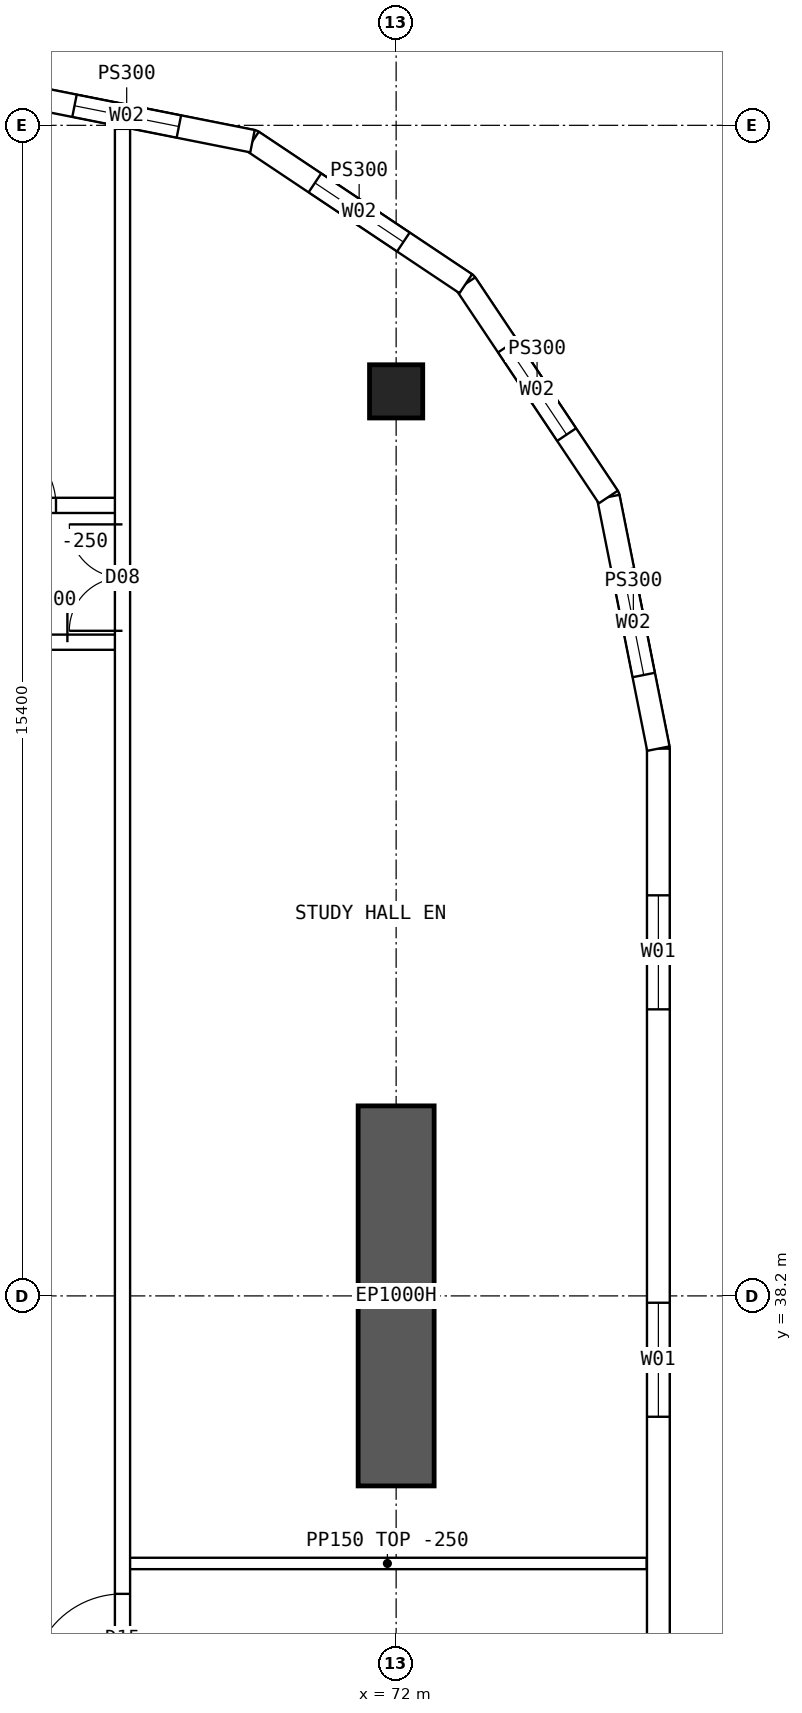
"""IFC4 building model, lengths in metres.
Left out: names, types, materials, properties, quantities, classifications, styles, units other than length and angle.
Written with IfcOpenShell. Run it as: python <this file> out.ifc"""

import sys

from ifc_helpers import new_model, si_unit, direction, frame, frame_2d, origin, origin_2d, place, context, subcontext, project, spatial, polyline, rectangle, hollow_rectangle, outline, extrude, element, fill, save


model = new_model("IFC4")
c1 = context("Model", 3, precision=1e-05, world=origin(), true_north=direction((0.0, 1.0)))
c2 = subcontext(c1, "Body", "Model", "MODEL_VIEW")
j1 = project(units=[si_unit("LENGTHUNIT", "METRE"), si_unit("PLANEANGLEUNIT", "RADIAN")], contexts=[c1])
p1 = place(None, origin())
s1 = spatial("IfcSite", under=j1, at=p1, CompositionType="ELEMENT")
p2 = place(p1, origin())
s2 = spatial("IfcBuilding", under=s1, at=p2, CompositionType="ELEMENT")
p3 = place(p2, frame((0.0, 0.0, 163.6)))
s3 = spatial("IfcBuildingStorey", under=s2, at=p3, CompositionType="ELEMENT", Elevation=163.6)
p4 = place(p3, frame((72.0, 50.1, 0.0), z_axis=(0.0, 0.0, 1.0), x_axis=(1.0, 0.0, 0.0)))
e1 = element("IfcColumn", 1, at=p4, inside=s3, PredefinedType="COLUMN", context=c2, shape_type="SweptSolid", body=[
    extrude(hollow_rectangle(XDim=0.7, YDim=0.7, WallThickness=0.07, at=origin_2d()), origin(), (0.0, 0.0, 1.0), 3.75),
])
p5 = place(p3, frame((72.0, 35.7, 0.0), z_axis=(0.0, 0.0, 1.0), x_axis=(0.0, 1.0, 0.0)))
e2 = element("IfcWall", 2, at=p5, inside=s3, PredefinedType="SHEAR", context=c2, shape_type="SweptSolid", body=[
    extrude(rectangle(XDim=5.0, YDim=1.0, at=frame_2d((2.5, 0.0))), origin(), (0.0, 0.0, 1.0), 3.75),
])
p6 = place(p3, frame((75.45, 18.6, 0.0), z_axis=(0.0, 0.0, 1.0), x_axis=(0.0, 1.0, 0.0)))
e3 = element("IfcWall", 3, at=p6, inside=s3, PredefinedType="SOLIDWALL", context=c2, shape_type="SweptSolid", body=[
    extrude(outline(polyline([(-0.015, -0.15), (26.815, -0.15), (26.785, 0.15), (0.015, 0.15), (-0.015, -0.15)])), origin(), (0.0, 0.0, 1.0), 3.5),
])
p7 = place(p6, frame((1.93, 0.0, 0.9)))
e4 = element("IfcOpeningElement", 4, at=p7, cuts=e3, PredefinedType="OPENING", context=c2, shape_type="SweptSolid", body=[
    extrude(rectangle(XDim=1.5, YDim=2.0, at=frame_2d((0.75, 1.0))), frame((0.0, 0.16, 0.0), z_axis=(0.0, -1.0, 0.0), x_axis=(1.0, 0.0, 0.0)), (0.0, 0.0, 1.0), 0.32),
])
p8 = place(p6, frame((7.29, 0.0, 0.9)))
e5 = element("IfcOpeningElement", 5, at=p8, cuts=e3, PredefinedType="OPENING", context=c2, shape_type="SweptSolid", body=[
    extrude(rectangle(XDim=1.5, YDim=2.0, at=frame_2d((0.75, 1.0))), frame((0.0, 0.16, 0.0), z_axis=(0.0, -1.0, 0.0), x_axis=(1.0, 0.0, 0.0)), (0.0, 0.0, 1.0), 0.32),
])
p9 = place(p6, frame((12.65, 0.0, 0.9)))
e6 = element("IfcOpeningElement", 6, at=p9, cuts=e3, PredefinedType="OPENING", context=c2, shape_type="SweptSolid", body=[
    extrude(rectangle(XDim=1.5, YDim=2.0, at=frame_2d((0.75, 1.0))), frame((0.0, 0.16, 0.0), z_axis=(0.0, -1.0, 0.0), x_axis=(1.0, 0.0, 0.0)), (0.0, 0.0, 1.0), 0.32),
])
p10 = place(p6, frame((18.01, 0.0, 0.9)))
e7 = element("IfcOpeningElement", 7, at=p10, cuts=e3, PredefinedType="OPENING", context=c2, shape_type="SweptSolid", body=[
    extrude(rectangle(XDim=1.5, YDim=2.0, at=frame_2d((0.75, 1.0))), frame((0.0, 0.16, 0.0), z_axis=(0.0, -1.0, 0.0), x_axis=(1.0, 0.0, 0.0)), (0.0, 0.0, 1.0), 0.32),
])
p11 = place(p6, frame((23.37, 0.0, 0.9)))
e8 = element("IfcOpeningElement", 8, at=p11, cuts=e3, PredefinedType="OPENING", context=c2, shape_type="SweptSolid", body=[
    extrude(rectangle(XDim=1.5, YDim=2.0, at=frame_2d((0.75, 1.0))), frame((0.0, 0.16, 0.0), z_axis=(0.0, -1.0, 0.0), x_axis=(1.0, 0.0, 0.0)), (0.0, 0.0, 1.0), 0.32),
])
p12 = place(p3, frame((75.45, 45.4, 0.0), z_axis=(0.0, 0.0, 1.0), x_axis=(-0.19508664885, 0.980786011034, 0.0)))
e9 = element("IfcWall", 9, at=p12, inside=s3, PredefinedType="SOLIDWALL", context=c2, shape_type="SweptSolid", body=[
    extrude(outline(polyline([(-0.015, -0.15), (3.405, -0.15), (3.345, 0.15), (0.015, 0.15), (-0.015, -0.15)])), origin(), (0.0, 0.0, 1.0), 3.5),
])
p13 = place(p12, frame((0.988, 0.0, 0.9)))
e10 = element("IfcOpeningElement", 10, at=p13, cuts=e9, PredefinedType="OPENING", context=c2, shape_type="SweptSolid", body=[
    extrude(rectangle(XDim=1.4, YDim=1.8, at=frame_2d((0.7, 0.9))), frame((0.0, 0.16, 0.0), z_axis=(0.0, -1.0, 0.0), x_axis=(1.0, 0.0, 0.0)), (0.0, 0.0, 1.0), 0.32),
])
p14 = place(p3, frame((74.792, 48.71, 0.0), z_axis=(0.0, 0.0, 1.0), x_axis=(-0.555534554399, 0.831493450887, 0.0)))
e11 = element("IfcWall", 11, at=p14, inside=s3, PredefinedType="SOLIDWALL", context=c2, shape_type="SweptSolid", body=[
    extrude(outline(polyline([(-0.03, -0.15), (3.405, -0.15), (3.345, 0.15), (0.03, 0.15), (-0.03, -0.15)])), origin(), (0.0, 0.0, 1.0), 3.5),
])
p15 = place(p14, frame((0.988, 0.0, 0.9)))
e12 = element("IfcOpeningElement", 12, at=p15, cuts=e11, PredefinedType="OPENING", context=c2, shape_type="SweptSolid", body=[
    extrude(rectangle(XDim=1.4, YDim=1.8, at=frame_2d((0.7, 0.9))), frame((0.0, 0.16, 0.0), z_axis=(0.0, -1.0, 0.0), x_axis=(1.0, 0.0, 0.0)), (0.0, 0.0, 1.0), 0.32),
])
p16 = place(p3, frame((72.917, 51.517, 0.0), z_axis=(0.0, 0.0, 1.0), x_axis=(-0.831493450887, 0.555534554399, 0.0)))
e13 = element("IfcWall", 13, at=p16, inside=s3, PredefinedType="SOLIDWALL", context=c2, shape_type="SweptSolid", body=[
    extrude(outline(polyline([(-0.03, -0.15), (3.405, -0.15), (3.345, 0.15), (0.03, 0.15), (-0.03, -0.15)])), origin(), (0.0, 0.0, 1.0), 3.5),
])
p17 = place(p16, frame((0.988, 0.0, 0.9)))
e14 = element("IfcOpeningElement", 14, at=p17, cuts=e13, PredefinedType="OPENING", context=c2, shape_type="SweptSolid", body=[
    extrude(rectangle(XDim=1.4, YDim=1.8, at=frame_2d((0.7, 0.9))), frame((0.0, 0.16, 0.0), z_axis=(0.0, -1.0, 0.0), x_axis=(1.0, 0.0, 0.0)), (0.0, 0.0, 1.0), 0.32),
])
p18 = place(p3, frame((70.11, 53.392, 0.0), z_axis=(0.0, 0.0, 1.0), x_axis=(-0.98078325777, 0.195100490205, 0.0)))
e15 = element("IfcWall", 15, at=p18, inside=s3, PredefinedType="SOLIDWALL", context=c2, shape_type="SweptSolid", body=[
    extrude(outline(polyline([(-0.03, -0.15), (3.405, -0.15), (3.345, 0.15), (0.03, 0.15), (-0.03, -0.15)])), origin(), (0.0, 0.0, 1.0), 3.5),
])
p19 = place(p18, frame((0.988, 0.0, 0.9)))
e16 = element("IfcOpeningElement", 16, at=p19, cuts=e15, PredefinedType="OPENING", context=c2, shape_type="SweptSolid", body=[
    extrude(rectangle(XDim=1.4, YDim=1.8, at=frame_2d((0.7, 0.9))), frame((0.0, 0.16, 0.0), z_axis=(0.0, -1.0, 0.0), x_axis=(1.0, 0.0, 0.0)), (0.0, 0.0, 1.0), 0.32),
])
p20 = place(p3, frame((66.425, 48.6, 0.0), z_axis=(0.0, 0.0, 1.0), x_axis=(1.0, 0.0, 0.0)))
e17 = element("IfcWall", 17, at=p20, inside=s3, PredefinedType="SOLIDWALL", context=c2, shape_type="SweptSolid", body=[
    extrude(rectangle(XDim=1.975, YDim=0.2, at=frame_2d((0.987, 0.0))), origin(), (0.0, 0.0, 1.0), 3.5),
])
p21 = place(p20, frame((0.2, 0.0, 0.0)))
e18 = element("IfcOpeningElement", 18, at=p21, cuts=e17, PredefinedType="OPENING", context=c2, shape_type="SweptSolid", body=[
    extrude(rectangle(XDim=0.9, YDim=2.1, at=frame_2d((0.45, 1.05))), frame((0.0, 0.11, 0.0), z_axis=(0.0, -1.0, 0.0), x_axis=(1.0, 0.0, 0.0)), (0.0, 0.0, 1.0), 0.22),
])
p22 = place(p3, frame((66.425, 46.8, 0.0), z_axis=(0.0, 0.0, 1.0), x_axis=(1.0, 0.0, 0.0)))
e19 = element("IfcWall", 19, at=p22, inside=s3, PredefinedType="SOLIDWALL", context=c2, shape_type="SweptSolid", body=[
    extrude(rectangle(XDim=1.975, YDim=0.2, at=frame_2d((0.987, 0.0))), origin(), (0.0, 0.0, 1.0), 3.5),
])
p23 = place(p22, frame((0.05, 0.0, 0.0)))
e20 = element("IfcOpeningElement", 20, at=p23, cuts=e19, PredefinedType="OPENING", context=c2, shape_type="SweptSolid", body=[
    extrude(rectangle(XDim=1.2, YDim=2.1, at=frame_2d((0.6, 1.05))), frame((0.0, 0.11, 0.0), z_axis=(0.0, -1.0, 0.0), x_axis=(1.0, 0.0, 0.0)), (0.0, 0.0, 1.0), 0.22),
])
p24 = place(p3, frame((68.4, 10.446, 0.0), z_axis=(0.0, 0.0, 1.0), x_axis=(0.0, 1.0, 0.0)))
e21 = element("IfcWall", 21, at=p24, inside=s3, PredefinedType="SOLIDWALL", context=c2, shape_type="SweptSolid", body=[
    extrude(rectangle(XDim=43.107, YDim=0.2, at=frame_2d((21.554, 0.0))), origin(), (0.0, 0.0, 1.0), 3.5),
])
p25 = place(p24, frame((13.914, 0.0, 0.0)))
e22 = element("IfcOpeningElement", 22, at=p25, cuts=e21, PredefinedType="OPENING", context=c2, shape_type="SweptSolid", body=[
    extrude(rectangle(XDim=1.2, YDim=2.1, at=frame_2d((0.6, 1.05))), frame((0.0, 0.11, 0.0), z_axis=(0.0, -1.0, 0.0), x_axis=(1.0, 0.0, 0.0)), (0.0, 0.0, 1.0), 0.22),
])
p26 = place(p24, frame((22.634, 0.0, 0.0)))
e23 = element("IfcOpeningElement", 23, at=p26, cuts=e21, PredefinedType="OPENING", context=c2, shape_type="SweptSolid", body=[
    extrude(rectangle(XDim=1.2, YDim=2.1, at=frame_2d((0.6, 1.05))), frame((0.0, 0.11, 0.0), z_axis=(0.0, -1.0, 0.0), x_axis=(1.0, 0.0, 0.0)), (0.0, 0.0, 1.0), 0.22),
])
p27 = place(p24, frame((5.104, 0.0, 0.0)))
e24 = element("IfcOpeningElement", 24, at=p27, cuts=e21, PredefinedType="OPENING", context=c2, shape_type="SweptSolid", body=[
    extrude(rectangle(XDim=1.4, YDim=2.1, at=frame_2d((0.7, 1.05))), frame((0.0, 0.11, 0.0), z_axis=(0.0, -1.0, 0.0), x_axis=(1.0, 0.0, 0.0)), (0.0, 0.0, 1.0), 0.22),
])
p28 = place(p24, frame((36.504, 0.0, 0.0)))
e25 = element("IfcOpeningElement", 25, at=p28, cuts=e21, PredefinedType="OPENING", context=c2, shape_type="SweptSolid", body=[
    extrude(rectangle(XDim=1.4, YDim=2.1, at=frame_2d((0.7, 1.05))), frame((0.0, 0.11, 0.0), z_axis=(0.0, -1.0, 0.0), x_axis=(1.0, 0.0, 0.0)), (0.0, 0.0, 1.0), 0.22),
])
p29 = place(p3, frame((68.475, 34.68, 0.0), z_axis=(0.0, 0.0, 1.0), x_axis=(1.0, 0.0, 0.0)))
e26 = element("IfcWall", 26, at=p29, inside=s3, PredefinedType="PARTITIONING", context=c2, shape_type="SweptSolid", body=[
    extrude(outline(polyline([(0.0, 0.0), (6.82, 0.0), (6.82, 3.5), (3.827, 3.5), (3.825, 3.05), (3.227, 3.05), (3.225, 3.5), (0.0, 3.5), (0.0, 0.0)])), frame((0.0, 0.075, 0.0), z_axis=(0.0, -1.0, 0.0), x_axis=(1.0, 0.0, 0.0)), (0.0, 0.0, 1.0), 0.15),
])
p30 = place(p10, origin())
e27 = element("IfcWindow", 27, at=p30, inside=s3, PartitioningType="SINGLE_PANEL", PredefinedType="WINDOW", context=c2, shape_type="SweptSolid", body=[
    extrude(rectangle(XDim=1.5, YDim=2.0, at=frame_2d((0.75, 1.0))), frame((0.0, 0.03, 0.0), z_axis=(0.0, -1.0, 0.0), x_axis=(1.0, 0.0, 0.0)), (0.0, 0.0, 1.0), 0.06),
])
fill(e7, e27)
p31 = place(p11, origin())
e28 = element("IfcWindow", 28, at=p31, inside=s3, PartitioningType="SINGLE_PANEL", PredefinedType="WINDOW", context=c2, shape_type="SweptSolid", body=[
    extrude(rectangle(XDim=1.5, YDim=2.0, at=frame_2d((0.75, 1.0))), frame((0.0, 0.03, 0.0), z_axis=(0.0, -1.0, 0.0), x_axis=(1.0, 0.0, 0.0)), (0.0, 0.0, 1.0), 0.06),
])
fill(e8, e28)
p32 = place(p13, origin())
e29 = element("IfcWindow", 29, at=p32, inside=s3, PartitioningType="SINGLE_PANEL", PredefinedType="WINDOW", context=c2, shape_type="SweptSolid", body=[
    extrude(rectangle(XDim=1.4, YDim=1.8, at=frame_2d((0.7, 0.9))), frame((0.0, 0.03, 0.0), z_axis=(0.0, -1.0, 0.0), x_axis=(1.0, 0.0, 0.0)), (0.0, 0.0, 1.0), 0.06),
])
fill(e10, e29)
p33 = place(p15, origin())
e30 = element("IfcWindow", 30, at=p33, inside=s3, PartitioningType="SINGLE_PANEL", PredefinedType="WINDOW", context=c2, shape_type="SweptSolid", body=[
    extrude(rectangle(XDim=1.4, YDim=1.8, at=frame_2d((0.7, 0.9))), frame((0.0, 0.03, 0.0), z_axis=(0.0, -1.0, 0.0), x_axis=(1.0, 0.0, 0.0)), (0.0, 0.0, 1.0), 0.06),
])
fill(e12, e30)
p34 = place(p17, origin())
e31 = element("IfcWindow", 31, at=p34, inside=s3, PartitioningType="SINGLE_PANEL", PredefinedType="WINDOW", context=c2, shape_type="SweptSolid", body=[
    extrude(rectangle(XDim=1.4, YDim=1.8, at=frame_2d((0.7, 0.9))), frame((0.0, 0.03, 0.0), z_axis=(0.0, -1.0, 0.0), x_axis=(1.0, 0.0, 0.0)), (0.0, 0.0, 1.0), 0.06),
])
fill(e14, e31)
p35 = place(p19, origin())
e32 = element("IfcWindow", 32, at=p35, inside=s3, PartitioningType="SINGLE_PANEL", PredefinedType="WINDOW", context=c2, shape_type="SweptSolid", body=[
    extrude(rectangle(XDim=1.4, YDim=1.8, at=frame_2d((0.7, 0.9))), frame((0.0, 0.03, 0.0), z_axis=(0.0, -1.0, 0.0), x_axis=(1.0, 0.0, 0.0)), (0.0, 0.0, 1.0), 0.06),
])
fill(e16, e32)
p36 = place(p23, origin())
e33 = element("IfcDoor", 33, at=p36, inside=s3, OperationType="DOUBLE_DOOR_SINGLE_SWING", PredefinedType="DOOR", context=c2, shape_type="SweptSolid", body=[
    extrude(rectangle(XDim=1.2, YDim=2.1, at=frame_2d((0.6, 1.05))), frame((0.0, 0.025, 0.0), z_axis=(0.0, -1.0, 0.0), x_axis=(1.0, 0.0, 0.0)), (0.0, 0.0, 1.0), 0.05),
])
fill(e20, e33)
p37 = place(p26, origin())
e34 = element("IfcDoor", 34, at=p37, inside=s3, OperationType="SINGLE_SWING_LEFT", PredefinedType="DOOR", context=c2, shape_type="SweptSolid", body=[
    extrude(rectangle(XDim=1.2, YDim=2.1, at=frame_2d((0.6, 1.05))), frame((0.0, 0.025, 0.0), z_axis=(0.0, -1.0, 0.0), x_axis=(1.0, 0.0, 0.0)), (0.0, 0.0, 1.0), 0.05),
])
fill(e23, e34)
p38 = place(p28, origin())
e35 = element("IfcDoor", 35, at=p38, inside=s3, OperationType="DOUBLE_DOOR_SINGLE_SWING", PredefinedType="DOOR", context=c2, shape_type="SweptSolid", body=[
    extrude(rectangle(XDim=1.4, YDim=2.1, at=frame_2d((0.7, 1.05))), frame((0.0, 0.025, 0.0), z_axis=(0.0, -1.0, 0.0), x_axis=(1.0, 0.0, 0.0)), (0.0, 0.0, 1.0), 0.05),
])
fill(e25, e35)
p39 = place(p21, origin())
e36 = element("IfcDoor", 36, at=p39, inside=s3, OperationType="SINGLE_SWING_LEFT", PredefinedType="DOOR", context=c2, shape_type="SweptSolid", body=[
    extrude(rectangle(XDim=0.9, YDim=2.1, at=frame_2d((0.45, 1.05))), frame((0.0, 0.025, 0.0), z_axis=(0.0, -1.0, 0.0), x_axis=(1.0, 0.0, 0.0)), (0.0, 0.0, 1.0), 0.05),
])
fill(e18, e36)
save(model, sys.argv[1])
